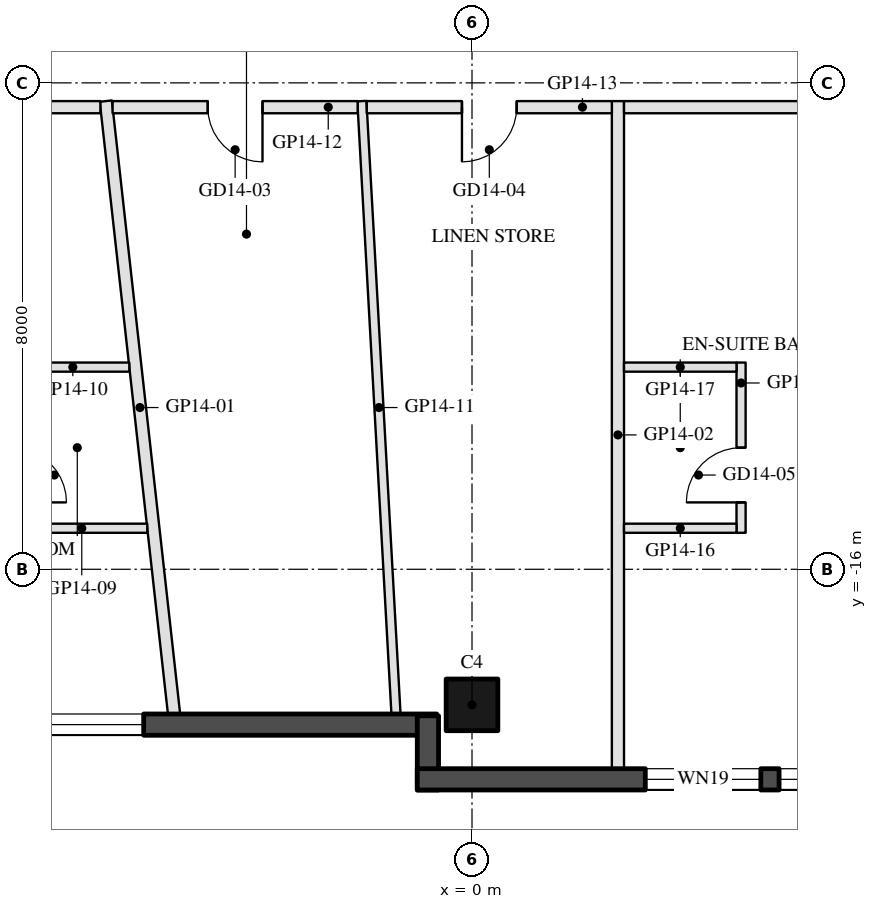
"""IFC4 building model, lengths in metres.
Left out: names, types, materials, properties, quantities, classifications, styles, units other than length and angle.
Written with IfcOpenShell. Run it as: python <this file> out.ifc"""

import sys

from ifc_helpers import new_model, si_unit, direction, frame, frame_2d, origin, origin_2d, place, context, subcontext, project, spatial, rectangle, hollow_rectangle, extrude, element, fill, save


model = new_model("IFC4")
c1 = context("Model", 3, precision=1e-05, world=origin(), true_north=direction((0.0, 1.0)))
c2 = subcontext(c1, "Body", "Model", "MODEL_VIEW")
j1 = project(units=[si_unit("LENGTHUNIT", "METRE"), si_unit("PLANEANGLEUNIT", "RADIAN")], contexts=[c1])
p1 = place(None, origin())
s1 = spatial("IfcSite", under=j1, at=p1, CompositionType="ELEMENT")
p2 = place(p1, origin())
s2 = spatial("IfcBuilding", under=s1, at=p2, CompositionType="ELEMENT")
p3 = place(p2, frame((0.0, 0.0, 161.4)))
s3 = spatial("IfcBuildingStorey", under=s2, at=p3, CompositionType="ELEMENT", Elevation=161.4)
p4 = place(p3, frame((0.0, -18.23, 0.0), z_axis=(0.0, 0.0, 1.0), x_axis=(-1.0, 0.0, 0.0)))
e1 = element("IfcColumn", 1, at=p4, inside=s3, PredefinedType="COLUMN", context=c2, shape_type="SweptSolid", body=[
    extrude(hollow_rectangle(XDim=0.85, YDim=0.85, WallThickness=0.04, at=origin_2d()), origin(), (0.0, 0.0, 1.0), 3.7),
])
p5 = place(p3, frame((-7.32, -18.555, 0.0), z_axis=(0.0, 0.0, 1.0), x_axis=(1.0, 0.0, 0.0)))
e2 = element("IfcWall", 2, at=p5, inside=s3, PredefinedType="SOLIDWALL", context=c2, shape_type="SweptSolid", body=[
    extrude(rectangle(XDim=6.74, YDim=0.35, at=frame_2d((3.37, 0.0))), origin(), (0.0, 0.0, 1.0), 3.55),
])
p6 = place(p5, frame((0.32, 0.0, 0.3)))
e3 = element("IfcOpeningElement", 3, at=p6, cuts=e2, PredefinedType="OPENING", context=c2, shape_type="SweptSolid", body=[
    extrude(rectangle(XDim=1.6, YDim=2.65, at=frame_2d((0.8, 1.325))), frame((0.0, 0.185, 0.0), z_axis=(0.0, -1.0, 0.0), x_axis=(1.0, 0.0, 0.0)), (0.0, 0.0, 1.0), 0.37),
])
p7 = place(p3, frame((-0.725, -18.41, 0.0), z_axis=(0.0, 0.0, 1.0), x_axis=(0.0, -1.0, 0.0)))
e4 = element("IfcWall", 4, at=p7, inside=s3, PredefinedType="SOLIDWALL", context=c2, shape_type="SweptSolid", body=[
    extrude(rectangle(XDim=1.22, YDim=0.35, at=frame_2d((0.61, 0.0))), origin(), (0.0, 0.0, 1.0), 3.55),
])
p8 = place(p3, frame((-0.9, -19.455, 0.0), z_axis=(0.0, 0.0, 1.0), x_axis=(1.0, 0.0, 0.0)))
e5 = element("IfcWall", 5, at=p8, inside=s3, PredefinedType="SOLIDWALL", context=c2, shape_type="SweptSolid", body=[
    extrude(rectangle(XDim=9.7, YDim=0.35, at=frame_2d((4.85, 0.0))), origin(), (0.0, 0.0, 1.0), 3.55),
])
p9 = place(p8, frame((3.75, 0.0, 0.3)))
e6 = element("IfcOpeningElement", 6, at=p9, cuts=e5, PredefinedType="OPENING", context=c2, shape_type="SweptSolid", body=[
    extrude(rectangle(XDim=1.9, YDim=2.65, at=frame_2d((0.95, 1.325))), frame((0.0, 0.185, 0.0), z_axis=(0.0, -1.0, 0.0), x_axis=(1.0, 0.0, 0.0)), (0.0, 0.0, 1.0), 0.37),
])
p10 = place(p8, frame((5.95, 0.0, 0.3)))
e7 = element("IfcOpeningElement", 7, at=p10, cuts=e5, PredefinedType="OPENING", context=c2, shape_type="SweptSolid", body=[
    extrude(rectangle(XDim=1.9, YDim=2.65, at=frame_2d((0.95, 1.325))), frame((0.0, 0.185, 0.0), z_axis=(0.0, -1.0, 0.0), x_axis=(1.0, 0.0, 0.0)), (0.0, 0.0, 1.0), 0.37),
])
p11 = place(p3, frame((-4.9, -18.38, 0.0), z_axis=(0.0, 0.0, 1.0), x_axis=(-0.110634961609, 0.993861109648, 0.0)))
e8 = element("IfcWall", 8, at=p11, inside=s3, PredefinedType="PARTITIONING", context=c2, shape_type="SweptSolid", body=[
    extrude(rectangle(XDim=10.142, YDim=0.2, at=frame_2d((5.071, 0.0))), origin(), (0.0, 0.0, 1.0), 3.06),
])
p12 = place(p3, frame((2.4, -19.28, 0.0), z_axis=(0.0, 0.0, 1.0), x_axis=(0.0, 1.0, 0.0)))
e9 = element("IfcWall", 9, at=p12, inside=s3, PredefinedType="PARTITIONING", context=c2, shape_type="SweptSolid", body=[
    extrude(rectangle(XDim=10.98, YDim=0.2, at=frame_2d((5.49, 0.0))), origin(), (0.0, 0.0, 1.0), 3.06),
])
p13 = place(p3, frame((-6.112, -8.4, 0.0), z_axis=(0.0, 0.0, 1.0), x_axis=(-1.0, 0.0, 0.0)))
e10 = element("IfcWall", 10, at=p13, inside=s3, PredefinedType="PARTITIONING", context=c2, shape_type="SweptSolid", body=[
    extrude(rectangle(XDim=3.876, YDim=0.2, at=frame_2d((1.938, 0.0))), origin(), (0.0, 0.0, 1.0), 2.95),
])
p14 = place(p13, frame((1.438, 0.0, 0.0)))
e11 = element("IfcOpeningElement", 11, at=p14, cuts=e10, PredefinedType="OPENING", context=c2, shape_type="SweptSolid", body=[
    extrude(rectangle(XDim=1.0, YDim=2.1, at=frame_2d((0.5, 1.05))), frame((0.0, 0.11, 0.0), z_axis=(0.0, -1.0, 0.0), x_axis=(1.0, 0.0, 0.0)), (0.0, 0.0, 1.0), 0.22),
])
p15 = place(p3, frame((-7.494, -15.325, 0.0), z_axis=(0.0, 0.0, 1.0), x_axis=(1.0, 0.0, 0.0)))
e12 = element("IfcWall", 12, at=p15, inside=s3, PredefinedType="PARTITIONING", context=c2, shape_type="SweptSolid", body=[
    extrude(rectangle(XDim=2.153, YDim=0.15, at=frame_2d((1.077, 0.0))), origin(), (0.0, 0.0, 1.0), 3.55),
])
p16 = place(p3, frame((-7.494, -12.675, 0.0), z_axis=(0.0, 0.0, 1.0), x_axis=(1.0, 0.0, 0.0)))
e13 = element("IfcWall", 13, at=p16, inside=s3, PredefinedType="PARTITIONING", context=c2, shape_type="SweptSolid", body=[
    extrude(rectangle(XDim=1.858, YDim=0.15, at=frame_2d((0.929, 0.0))), origin(), (0.0, 0.0, 1.0), 3.55),
])
p17 = place(p3, frame((-1.25, -18.38, 0.0), z_axis=(0.0, 0.0, 1.0), x_axis=(-0.055573151667, 0.998454618305, 0.0)))
e14 = element("IfcWall", 14, at=p17, inside=s3, PredefinedType="PARTITIONING", context=c2, shape_type="SweptSolid", body=[
    extrude(rectangle(XDim=10.095, YDim=0.15, at=frame_2d((5.048, 0.0))), origin(), (0.0, 0.0, 1.0), 3.06),
])
p18 = place(p3, frame((-1.881, -8.4, 0.0), z_axis=(0.0, 0.0, 1.0), x_axis=(-1.0, 0.0, 0.0)))
e15 = element("IfcWall", 15, at=p18, inside=s3, PredefinedType="PARTITIONING", context=c2, shape_type="SweptSolid", body=[
    extrude(rectangle(XDim=4.03, YDim=0.2, at=frame_2d((2.015, 0.0))), origin(), (0.0, 0.0, 1.0), 2.95),
])
p19 = place(p18, frame((1.565, 0.0, 0.0)))
e16 = element("IfcOpeningElement", 16, at=p19, cuts=e15, PredefinedType="OPENING", context=c2, shape_type="SweptSolid", body=[
    extrude(rectangle(XDim=0.9, YDim=2.1, at=frame_2d((0.45, 1.05))), frame((0.0, 0.11, 0.0), z_axis=(0.0, -1.0, 0.0), x_axis=(1.0, 0.0, 0.0)), (0.0, 0.0, 1.0), 0.22),
])
p20 = place(p3, frame((2.3, -8.4, 0.0), z_axis=(0.0, 0.0, 1.0), x_axis=(-1.0, 0.0, 0.0)))
e17 = element("IfcWall", 17, at=p20, inside=s3, PredefinedType="PARTITIONING", context=c2, shape_type="SweptSolid", body=[
    extrude(rectangle(XDim=4.031, YDim=0.2, at=frame_2d((2.015, 0.0))), origin(), (0.0, 0.0, 1.0), 2.95),
])
p21 = place(p20, frame((1.565, 0.0, 0.0)))
e18 = element("IfcOpeningElement", 18, at=p21, cuts=e17, PredefinedType="OPENING", context=c2, shape_type="SweptSolid", body=[
    extrude(rectangle(XDim=0.9, YDim=2.1, at=frame_2d((0.45, 1.05))), frame((0.0, 0.11, 0.0), z_axis=(0.0, -1.0, 0.0), x_axis=(1.0, 0.0, 0.0)), (0.0, 0.0, 1.0), 0.22),
])
p22 = place(p3, frame((9.988, -8.4, 0.0), z_axis=(0.0, 0.0, 1.0), x_axis=(-1.0, 0.0, 0.0)))
e19 = element("IfcWall", 19, at=p22, inside=s3, PredefinedType="PARTITIONING", context=c2, shape_type="SweptSolid", body=[
    extrude(rectangle(XDim=7.488, YDim=0.2, at=frame_2d((3.744, 0.0))), origin(), (0.0, 0.0, 1.0), 2.95),
])
p23 = place(p22, frame((3.244, 0.0, 0.0)))
e20 = element("IfcOpeningElement", 20, at=p23, cuts=e19, PredefinedType="OPENING", context=c2, shape_type="SweptSolid", body=[
    extrude(rectangle(XDim=1.0, YDim=2.1, at=frame_2d((0.5, 1.05))), frame((0.0, 0.11, 0.0), z_axis=(0.0, -1.0, 0.0), x_axis=(1.0, 0.0, 0.0)), (0.0, 0.0, 1.0), 0.22),
])
p24 = place(p3, frame((4.425, -15.4, 0.0), z_axis=(0.0, 0.0, 1.0), x_axis=(0.0, 1.0, 0.0)))
e21 = element("IfcWall", 21, at=p24, inside=s3, PredefinedType="PARTITIONING", context=c2, shape_type="SweptSolid", body=[
    extrude(rectangle(XDim=2.8, YDim=0.15, at=frame_2d((1.4, 0.0))), origin(), (0.0, 0.0, 1.0), 3.55),
])
p25 = place(p24, frame((0.5, 0.0, 0.0)))
e22 = element("IfcOpeningElement", 22, at=p25, cuts=e21, PredefinedType="OPENING", context=c2, shape_type="SweptSolid", body=[
    extrude(rectangle(XDim=0.9, YDim=2.1, at=frame_2d((0.45, 1.05))), frame((0.0, 0.085, 0.0), z_axis=(0.0, -1.0, 0.0), x_axis=(1.0, 0.0, 0.0)), (0.0, 0.0, 1.0), 0.17),
])
for number, where, z_axis, x_axis in (
    (23, (2.5, -15.325, 0.0), (0.0, 0.0, 1.0), (1.0, 0.0, 0.0)),
    (24, (2.5, -12.675, 0.0), (0.0, 0.0, 1.0), (1.0, 0.0, 0.0)),
):
    element("IfcWall", number, at=place(p3, frame(where, z_axis=z_axis, x_axis=x_axis)), inside=s3, PredefinedType="PARTITIONING", context=c2, shape_type="SweptSolid", body=[
        extrude(rectangle(XDim=1.85, YDim=0.15, at=frame_2d((0.925, 0.0))), origin(), (0.0, 0.0, 1.0), 2.95),
    ])
p26 = place(p6, origin())
e25 = element("IfcWindow", 25, at=p26, inside=s3, PartitioningType="SINGLE_PANEL", PredefinedType="WINDOW", context=c2, shape_type="SweptSolid", body=[
    extrude(rectangle(XDim=1.6, YDim=2.65, at=frame_2d((0.8, 1.325))), frame((0.0, 0.03, 0.0), z_axis=(0.0, -1.0, 0.0), x_axis=(1.0, 0.0, 0.0)), (0.0, 0.0, 1.0), 0.06),
])
fill(e3, e25)
p27 = place(p9, origin())
e26 = element("IfcWindow", 26, at=p27, inside=s3, PartitioningType="SINGLE_PANEL", PredefinedType="WINDOW", context=c2, shape_type="SweptSolid", body=[
    extrude(rectangle(XDim=1.9, YDim=2.65, at=frame_2d((0.95, 1.325))), frame((0.0, 0.03, 0.0), z_axis=(0.0, -1.0, 0.0), x_axis=(1.0, 0.0, 0.0)), (0.0, 0.0, 1.0), 0.06),
])
fill(e6, e26)
p28 = place(p10, origin())
e27 = element("IfcWindow", 27, at=p28, inside=s3, PartitioningType="SINGLE_PANEL", PredefinedType="WINDOW", context=c2, shape_type="SweptSolid", body=[
    extrude(rectangle(XDim=1.9, YDim=2.65, at=frame_2d((0.95, 1.325))), frame((0.0, 0.03, 0.0), z_axis=(0.0, -1.0, 0.0), x_axis=(1.0, 0.0, 0.0)), (0.0, 0.0, 1.0), 0.06),
])
fill(e7, e27)
p29 = place(p19, origin())
e28 = element("IfcDoor", 28, at=p29, inside=s3, OperationType="SINGLE_SWING_LEFT", PredefinedType="DOOR", context=c2, shape_type="SweptSolid", body=[
    extrude(rectangle(XDim=0.9, YDim=2.1, at=frame_2d((0.45, 1.05))), frame((0.0, 0.025, 0.0), z_axis=(0.0, -1.0, 0.0), x_axis=(1.0, 0.0, 0.0)), (0.0, 0.0, 1.0), 0.05),
])
fill(e16, e28)
p30 = place(p21, origin())
e29 = element("IfcDoor", 29, at=p30, inside=s3, OperationType="SINGLE_SWING_RIGHT", PredefinedType="DOOR", context=c2, shape_type="SweptSolid", body=[
    extrude(rectangle(XDim=0.9, YDim=2.1, at=frame_2d((0.45, 1.05))), frame((0.0, 0.025, 0.0), z_axis=(0.0, -1.0, 0.0), x_axis=(1.0, 0.0, 0.0)), (0.0, 0.0, 1.0), 0.05),
])
fill(e18, e29)
p31 = place(p25, origin())
e30 = element("IfcDoor", 30, at=p31, inside=s3, OperationType="SINGLE_SWING_LEFT", PredefinedType="DOOR", context=c2, shape_type="SweptSolid", body=[
    extrude(rectangle(XDim=0.9, YDim=2.1, at=frame_2d((0.45, 1.05))), frame((0.0, 0.025, 0.0), z_axis=(0.0, -1.0, 0.0), x_axis=(1.0, 0.0, 0.0)), (0.0, 0.0, 1.0), 0.05),
])
fill(e22, e30)
save(model, sys.argv[1])
